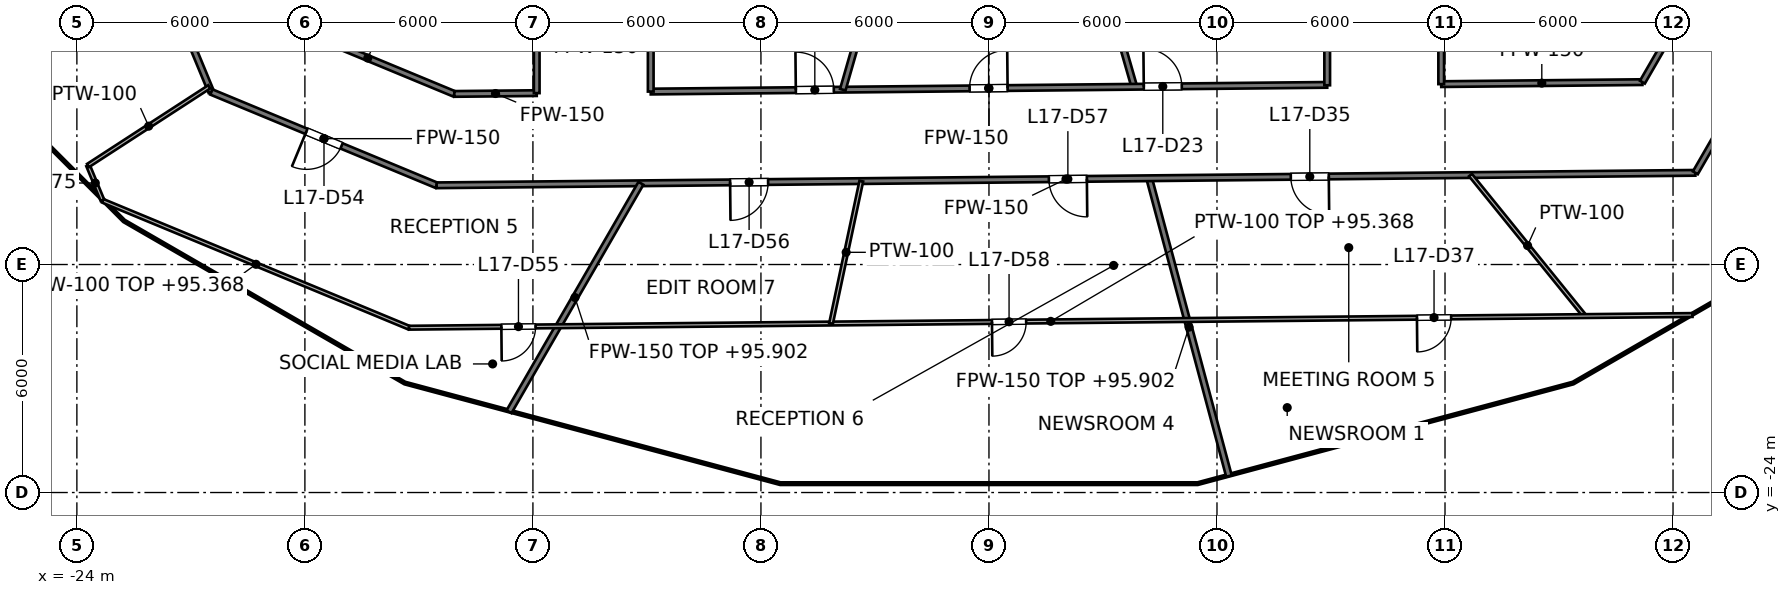
"""IFC4 building model, lengths in metres.
Left out: names, types, materials, properties, quantities, classifications, styles, units other than length and angle.
Written with IfcOpenShell. Run it as: python <this file> out.ifc"""

import sys

from ifc_helpers import new_model, si_unit, direction, frame, frame_2d, origin, place, context, subcontext, project, spatial, rectangle, extrude, element, fill, save


model = new_model("IFC4")
c1 = context("Model", 3, precision=1e-05, world=origin(), true_north=direction((0.0, 1.0)))
c2 = subcontext(c1, "Body", "Model", "MODEL_VIEW")
j1 = project(units=[si_unit("LENGTHUNIT", "METRE"), si_unit("PLANEANGLEUNIT", "RADIAN")], contexts=[c1])
p1 = place(None, origin())
s1 = spatial("IfcSite", under=j1, at=p1, CompositionType="ELEMENT")
p2 = place(p1, origin())
s2 = spatial("IfcBuilding", under=s1, at=p2, CompositionType="ELEMENT")
p3 = place(p2, frame((0.0, 0.0, 92.4)))
s3 = spatial("IfcBuildingStorey", under=s2, at=p3, CompositionType="ELEMENT", Elevation=92.4)
p4 = place(p3, frame((4.215, -15.73, 0.0), z_axis=(0.0, 0.0, 1.0), x_axis=(0.258844392232, -0.96591903419, 0.0)))
e1 = element("IfcWall", 1, at=p4, inside=s3, PredefinedType="PARTITIONING", context=c2, shape_type="SweptSolid", body=[
    extrude(rectangle(XDim=8.112, YDim=0.15, at=frame_2d((4.056, 0.0))), origin(), (0.0, 0.0, 1.0), 3.502),
])
p5 = place(p3, frame((2.296, -8.0, 0.0), z_axis=(0.0, 0.0, 1.0), x_axis=(0.275935525478, -0.961176147113, 0.0)))
e2 = element("IfcWall", 2, at=p5, inside=s3, PredefinedType="PARTITIONING", context=c2, shape_type="SweptSolid", body=[
    extrude(rectangle(XDim=5.548, YDim=0.15, at=frame_2d((2.774, 0.0))), origin(), (0.0, 0.0, 1.0), 3.9),
])
p6 = place(p3, frame((-22.9, -7.572, 0.0), z_axis=(0.0, 0.0, 1.0), x_axis=(0.382367581622, -0.924010298928, 0.0)))
e3 = element("IfcWall", 3, at=p6, inside=s3, PredefinedType="PARTITIONING", context=c2, shape_type="SweptSolid", body=[
    extrude(rectangle(XDim=6.374, YDim=0.15, at=frame_2d((3.187, 0.0))), origin(), (0.0, 0.0, 1.0), 2.977),
])
p7 = place(p6, frame((2.6, 0.0, 0.0)))
e4 = element("IfcOpeningElement", 4, at=p7, cuts=e3, PredefinedType="OPENING", context=c2, shape_type="SweptSolid", body=[
    extrude(rectangle(XDim=1.0, YDim=2.1, at=frame_2d((0.5, 1.05))), frame((0.0, 0.075, 0.0), z_axis=(0.0, -1.0, 0.0), x_axis=(1.0, 0.0, 0.0)), (0.0, 0.0, 1.0), 0.15),
])
p8 = place(p3, frame((-20.46, -13.46, 0.0), z_axis=(0.0, 0.0, 1.0), x_axis=(0.923801547606, -0.382871650349, 0.0)))
e5 = element("IfcWall", 5, at=p8, inside=s3, PredefinedType="PARTITIONING", context=c2, shape_type="SweptSolid", body=[
    extrude(rectangle(XDim=6.415, YDim=0.15, at=frame_2d((3.208, 0.0))), origin(), (0.0, 0.0, 1.0), 2.968),
])
p9 = place(p8, frame((2.707, 0.0, 0.0)))
e6 = element("IfcOpeningElement", 6, at=p9, cuts=e5, PredefinedType="OPENING", context=c2, shape_type="SweptSolid", body=[
    extrude(rectangle(XDim=1.0, YDim=2.1, at=frame_2d((0.5, 1.05))), frame((0.0, 0.075, 0.0), z_axis=(0.0, -1.0, 0.0), x_axis=(1.0, 0.0, 0.0)), (0.0, 0.0, 1.0), 0.15),
])
p10 = place(p3, frame((-18.623, -11.623, 0.0), z_axis=(0.0, 0.0, 1.0), x_axis=(0.923791670587, -0.38289548098, 0.0)))
e7 = element("IfcWall", 7, at=p10, inside=s3, PredefinedType="PARTITIONING", context=c2, shape_type="SweptSolid", body=[
    extrude(rectangle(XDim=4.931, YDim=0.15, at=frame_2d((2.465, 0.0))), origin(), (0.0, 0.0, 1.0), 2.968),
])
p11 = place(p3, frame((-14.534, -15.916, 0.0), z_axis=(0.0, 0.0, 1.0), x_axis=(0.999950930262, 0.009906415532, 0.0)))
e8 = element("IfcWall", 8, at=p11, inside=s3, PredefinedType="PARTITIONING", context=c2, shape_type="SweptSolid", body=[
    extrude(rectangle(XDim=33.123, YDim=0.15, at=frame_2d((16.561, 0.0))), origin(), (0.0, 0.0, 1.0), 2.968),
])
p12 = place(p11, frame((22.477, 0.0, 0.0)))
e9 = element("IfcOpeningElement", 9, at=p12, cuts=e8, PredefinedType="OPENING", context=c2, shape_type="SweptSolid", body=[
    extrude(rectangle(XDim=1.0, YDim=2.1, at=frame_2d((0.5, 1.05))), frame((0.0, 0.075, 0.0), z_axis=(0.0, -1.0, 0.0), x_axis=(1.0, 0.0, 0.0)), (0.0, 0.0, 1.0), 0.15),
])
p13 = place(p11, frame((7.723, 0.0, 0.0)))
e10 = element("IfcOpeningElement", 10, at=p13, cuts=e8, PredefinedType="OPENING", context=c2, shape_type="SweptSolid", body=[
    extrude(rectangle(XDim=1.0, YDim=2.1, at=frame_2d((0.5, 1.05))), frame((0.0, 0.075, 0.0), z_axis=(0.0, -1.0, 0.0), x_axis=(1.0, 0.0, 0.0)), (0.0, 0.0, 1.0), 0.15),
])
p14 = place(p11, frame((16.111, 0.0, 0.0)))
e11 = element("IfcOpeningElement", 11, at=p14, cuts=e8, PredefinedType="OPENING", context=c2, shape_type="SweptSolid", body=[
    extrude(rectangle(XDim=1.0, YDim=2.1, at=frame_2d((0.5, 1.05))), frame((0.0, 0.075, 0.0), z_axis=(0.0, -1.0, 0.0), x_axis=(1.0, 0.0, 0.0)), (0.0, 0.0, 1.0), 0.15),
])
p15 = place(p3, frame((-14.068, -13.511, 0.0), z_axis=(0.0, 0.0, 1.0), x_axis=(0.999950911515, 0.009908307647, 0.0)))
e12 = element("IfcWall", 12, at=p15, inside=s3, PredefinedType="PARTITIONING", context=c2, shape_type="SweptSolid", body=[
    extrude(rectangle(XDim=2.168, YDim=0.15, at=frame_2d((1.084, 0.0))), origin(), (0.0, 0.0, 1.0), 2.968),
])
p16 = place(p3, frame((-8.9, -13.449, 0.0), z_axis=(0.0, 0.0, 1.0), x_axis=(0.999950834077, 0.009916119672, 0.0)))
e13 = element("IfcWall", 13, at=p16, inside=s3, PredefinedType="PARTITIONING", context=c2, shape_type="SweptSolid", body=[
    extrude(rectangle(XDim=17.801, YDim=0.15, at=frame_2d((8.9, 0.0))), origin(), (0.0, 0.0, 1.0), 2.968),
])
p17 = place(p16, frame((3.818, 0.0, 0.0)))
e14 = element("IfcOpeningElement", 14, at=p17, cuts=e13, PredefinedType="OPENING", context=c2, shape_type="SweptSolid", body=[
    extrude(rectangle(XDim=1.0, YDim=2.1, at=frame_2d((0.5, 1.05))), frame((0.0, 0.075, 0.0), z_axis=(0.0, -1.0, 0.0), x_axis=(1.0, 0.0, 0.0)), (0.0, 0.0, 1.0), 0.15),
])
p18 = place(p16, frame((8.391, 0.0, 0.0)))
e15 = element("IfcOpeningElement", 15, at=p18, cuts=e13, PredefinedType="OPENING", context=c2, shape_type="SweptSolid", body=[
    extrude(rectangle(XDim=1.0, YDim=2.1, at=frame_2d((0.5, 1.05))), frame((0.0, 0.075, 0.0), z_axis=(0.0, -1.0, 0.0), x_axis=(1.0, 0.0, 0.0)), (0.0, 0.0, 1.0), 0.15),
])
p19 = place(p16, frame((12.975, 0.0, 0.0)))
e16 = element("IfcOpeningElement", 16, at=p19, cuts=e13, PredefinedType="OPENING", context=c2, shape_type="SweptSolid", body=[
    extrude(rectangle(XDim=1.0, YDim=2.1, at=frame_2d((0.5, 1.05))), frame((0.0, 0.075, 0.0), z_axis=(0.0, -1.0, 0.0), x_axis=(1.0, 0.0, 0.0)), (0.0, 0.0, 1.0), 0.15),
])
p20 = place(p3, frame((11.9, -13.253, 0.0), z_axis=(0.0, 0.0, 1.0), x_axis=(0.999950853109, 0.009914200296, 0.0)))
e17 = element("IfcWall", 17, at=p20, inside=s3, PredefinedType="PARTITIONING", context=c2, shape_type="SweptSolid", body=[
    extrude(rectangle(XDim=5.294, YDim=0.15, at=frame_2d((2.647, 0.0))), origin(), (0.0, 0.0, 1.0), 2.968),
])
p21 = place(p3, frame((18.587, -15.587, 0.0), z_axis=(0.0, 0.0, 1.0), x_axis=(0.500026433136, 0.866010142069, 0.0)))
e18 = element("IfcWall", 18, at=p21, inside=s3, PredefinedType="PARTITIONING", context=c2, shape_type="SweptSolid", body=[
    extrude(rectangle(XDim=8.713, YDim=0.15, at=frame_2d((4.357, 0.0))), origin(), (0.0, 0.0, 1.0), 2.968),
])
p22 = place(p21, frame((3.807, 0.0, 0.0)))
e19 = element("IfcOpeningElement", 19, at=p22, cuts=e18, PredefinedType="OPENING", context=c2, shape_type="SweptSolid", body=[
    extrude(rectangle(XDim=1.0, YDim=2.1, at=frame_2d((0.5, 1.05))), frame((0.0, 0.075, 0.0), z_axis=(0.0, -1.0, 0.0), x_axis=(1.0, 0.0, 0.0)), (0.0, 0.0, 1.0), 0.15),
])
p23 = place(p3, frame((17.194, -13.201, 0.0), z_axis=(0.0, 0.0, 1.0), x_axis=(0.50001062018, 0.866019272134, 0.0)))
e20 = element("IfcWall", 20, at=p23, inside=s3, PredefinedType="PARTITIONING", context=c2, shape_type="SweptSolid", body=[
    extrude(rectangle(XDim=6.674, YDim=0.15, at=frame_2d((3.337, 0.0))), origin(), (0.0, 0.0, 1.0), 2.968),
])
p24 = place(p23, frame((2.833, 0.0, 0.0)))
e21 = element("IfcOpeningElement", 21, at=p24, cuts=e20, PredefinedType="OPENING", context=c2, shape_type="SweptSolid", body=[
    extrude(rectangle(XDim=1.0, YDim=2.1, at=frame_2d((0.5, 1.05))), frame((0.0, 0.075, 0.0), z_axis=(0.0, -1.0, 0.0), x_axis=(1.0, 0.0, 0.0)), (0.0, 0.0, 1.0), 0.15),
])
p25 = place(p3, frame((-12.629, -21.874, 0.0), z_axis=(0.0, 0.0, 1.0), x_axis=(0.499986326517, 0.86603329803, 0.0)))
e22 = element("IfcWall", 22, at=p25, inside=s3, PredefinedType="PARTITIONING", context=c2, shape_type="SweptSolid", body=[
    extrude(rectangle(XDim=6.941, YDim=0.15, at=frame_2d((3.471, 0.0))), origin(), (0.0, 0.0, 1.0), 3.502),
])
p26 = place(p3, frame((-3.846, -13.399, 0.0), z_axis=(0.0, 0.0, 1.0), x_axis=(0.275914969745, 0.961182048038, 0.0)))
e23 = element("IfcWall", 23, at=p26, inside=s3, PredefinedType="PARTITIONING", context=c2, shape_type="SweptSolid", body=[
    extrude(rectangle(XDim=5.617, YDim=0.15, at=frame_2d((2.809, 0.0))), origin(), (0.0, 0.0, 1.0), 3.9),
])
p27 = place(p3, frame((11.9, -13.253, 0.0), z_axis=(0.0, 0.0, 1.0), x_axis=(0.0, 1.0, 0.0)))
e24 = element("IfcWall", 24, at=p27, inside=s3, PredefinedType="PARTITIONING", context=c2, shape_type="SweptSolid", body=[
    extrude(rectangle(XDim=5.253, YDim=0.15, at=frame_2d((2.626, 0.0))), origin(), (0.0, 0.0, 1.0), 2.968),
])
p28 = place(p3, frame((8.9, -13.283, 0.0), z_axis=(0.0, 0.0, 1.0), x_axis=(0.0, 1.0, 0.0)))
e25 = element("IfcWall", 25, at=p28, inside=s3, PredefinedType="PARTITIONING", context=c2, shape_type="SweptSolid", body=[
    extrude(rectangle(XDim=5.283, YDim=0.15, at=frame_2d((2.642, 0.0))), origin(), (0.0, 0.0, 1.0), 2.968),
])
p29 = place(p3, frame((-8.9, -13.449, 0.0), z_axis=(0.0, 0.0, 1.0), x_axis=(0.0, 1.0, 0.0)))
e26 = element("IfcWall", 26, at=p29, inside=s3, PredefinedType="PARTITIONING", context=c2, shape_type="SweptSolid", body=[
    extrude(rectangle(XDim=5.449, YDim=0.15, at=frame_2d((2.725, 0.0))), origin(), (0.0, 0.0, 1.0), 2.968),
])
p30 = place(p3, frame((-11.9, -13.49, 0.0), z_axis=(0.0, 0.0, 1.0), x_axis=(0.0, 1.0, 0.0)))
e27 = element("IfcWall", 27, at=p30, inside=s3, PredefinedType="PARTITIONING", context=c2, shape_type="SweptSolid", body=[
    extrude(rectangle(XDim=5.49, YDim=0.15, at=frame_2d((2.745, 0.0))), origin(), (0.0, 0.0, 1.0), 2.968),
])
p31 = place(p30, frame((2.245, 0.0, 0.0)))
e28 = element("IfcOpeningElement", 28, at=p31, cuts=e27, PredefinedType="OPENING", context=c2, shape_type="SweptSolid", body=[
    extrude(rectangle(XDim=1.0, YDim=2.1, at=frame_2d((0.5, 1.05))), frame((0.0, 0.075, 0.0), z_axis=(0.0, -1.0, 0.0), x_axis=(1.0, 0.0, 0.0)), (0.0, 0.0, 1.0), 0.15),
])
p32 = place(p3, frame((-23.706, -15.395, 0.0), z_axis=(0.0, 0.0, 1.0), x_axis=(0.382734348683, -0.923858440638, 0.0)))
e29 = element("IfcWall", 29, at=p32, inside=s3, PredefinedType="PARTITIONING", context=c2, shape_type="SweptSolid", body=[
    extrude(rectangle(XDim=0.996, YDim=0.1, at=frame_2d((0.498, 0.0))), origin(), (0.0, 0.0, 1.0), 3.675),
])
p33 = place(p3, frame((12.67, -15.646, 0.0), z_axis=(0.0, 0.0, 1.0), x_axis=(0.629429152062, -0.777057875923, 0.0)))
e30 = element("IfcWall", 30, at=p33, inside=s3, PredefinedType="PARTITIONING", context=c2, shape_type="SweptSolid", body=[
    extrude(rectangle(XDim=4.774, YDim=0.1, at=frame_2d((2.387, 0.0))), origin(), (0.0, 0.0, 1.0), 3.9),
])
p34 = place(p3, frame((-23.315, -16.325, 0.0), z_axis=(0.0, 0.0, 1.0), x_axis=(0.923811686722, -0.382847185541, 0.0)))
e31 = element("IfcWall", 31, at=p34, inside=s3, PredefinedType="PARTITIONING", context=c2, shape_type="SweptSolid", body=[
    extrude(rectangle(XDim=8.719, YDim=0.1, at=frame_2d((4.36, 0.0))), origin(), (0.0, 0.0, 1.0), 2.968),
])
p35 = place(p3, frame((-15.26, -19.663, 0.0), z_axis=(0.0, 0.0, 1.0), x_axis=(0.999951032014, 0.009896139397, 0.0)))
e32 = element("IfcWall", 32, at=p35, inside=s3, PredefinedType="PARTITIONING", context=c2, shape_type="SweptSolid", body=[
    extrude(rectangle(XDim=33.774, YDim=0.1, at=frame_2d((16.887, 0.0))), origin(), (0.0, 0.0, 1.0), 2.968),
])
p36 = place(p35, frame((26.523, 0.0, 0.0)))
e33 = element("IfcOpeningElement", 33, at=p36, cuts=e32, PredefinedType="OPENING", context=c2, shape_type="SweptSolid", body=[
    extrude(rectangle(XDim=0.9, YDim=2.1, at=frame_2d((0.45, 1.05))), frame((0.0, 0.05, 0.0), z_axis=(0.0, -1.0, 0.0), x_axis=(1.0, 0.0, 0.0)), (0.0, 0.0, 1.0), 0.1),
])
p37 = place(p35, frame((2.43, 0.0, 0.0)))
e34 = element("IfcOpeningElement", 34, at=p37, cuts=e32, PredefinedType="OPENING", context=c2, shape_type="SweptSolid", body=[
    extrude(rectangle(XDim=0.9, YDim=2.1, at=frame_2d((0.45, 1.05))), frame((0.0, 0.05, 0.0), z_axis=(0.0, -1.0, 0.0), x_axis=(1.0, 0.0, 0.0)), (0.0, 0.0, 1.0), 0.1),
])
p38 = place(p35, frame((15.34, 0.0, 0.0)))
e35 = element("IfcOpeningElement", 35, at=p38, cuts=e32, PredefinedType="OPENING", context=c2, shape_type="SweptSolid", body=[
    extrude(rectangle(XDim=0.9, YDim=2.1, at=frame_2d((0.45, 1.05))), frame((0.0, 0.05, 0.0), z_axis=(0.0, -1.0, 0.0), x_axis=(1.0, 0.0, 0.0)), (0.0, 0.0, 1.0), 0.1),
])
p39 = place(p3, frame((-23.706, -15.395, 0.0), z_axis=(0.0, 0.0, 1.0), x_axis=(0.838733884708, 0.544541523341, 0.0)))
e36 = element("IfcWall", 36, at=p39, inside=s3, PredefinedType="PARTITIONING", context=c2, shape_type="SweptSolid", body=[
    extrude(rectangle(XDim=3.803, YDim=0.1, at=frame_2d((1.902, 0.0))), origin(), (0.0, 0.0, 1.0), 3.9),
])
p40 = place(p3, frame((-4.156, -19.553, 0.0), z_axis=(0.0, 0.0, 1.0), x_axis=(0.208023345905, 0.978123861052, 0.0)))
e37 = element("IfcWall", 37, at=p40, inside=s3, PredefinedType="PARTITIONING", context=c2, shape_type="SweptSolid", body=[
    extrude(rectangle(XDim=3.832, YDim=0.1, at=frame_2d((1.916, 0.0))), origin(), (0.0, 0.0, 1.0), 3.9),
])
p41 = place(p17, origin())
e38 = element("IfcDoor", 38, at=p41, inside=s3, OperationType="SINGLE_SWING_LEFT", PredefinedType="DOOR", context=c2, shape_type="SweptSolid", body=[
    extrude(rectangle(XDim=1.0, YDim=2.1, at=frame_2d((0.5, 1.05))), frame((0.0, 0.025, 0.0), z_axis=(0.0, -1.0, 0.0), x_axis=(1.0, 0.0, 0.0)), (0.0, 0.0, 1.0), 0.05),
])
fill(e14, e38)
p42 = place(p18, origin())
e39 = element("IfcDoor", 39, at=p42, inside=s3, OperationType="SINGLE_SWING_RIGHT", PredefinedType="DOOR", context=c2, shape_type="SweptSolid", body=[
    extrude(rectangle(XDim=1.0, YDim=2.1, at=frame_2d((0.5, 1.05))), frame((0.0, 0.025, 0.0), z_axis=(0.0, -1.0, 0.0), x_axis=(1.0, 0.0, 0.0)), (0.0, 0.0, 1.0), 0.05),
])
fill(e15, e39)
p43 = place(p19, origin())
e40 = element("IfcDoor", 40, at=p43, inside=s3, OperationType="SINGLE_SWING_LEFT", PredefinedType="DOOR", context=c2, shape_type="SweptSolid", body=[
    extrude(rectangle(XDim=1.0, YDim=2.1, at=frame_2d((0.5, 1.05))), frame((0.0, 0.025, 0.0), z_axis=(0.0, -1.0, 0.0), x_axis=(1.0, 0.0, 0.0)), (0.0, 0.0, 1.0), 0.05),
])
fill(e16, e40)
p44 = place(p12, origin())
e41 = element("IfcDoor", 41, at=p44, inside=s3, OperationType="SINGLE_SWING_RIGHT", PredefinedType="DOOR", context=c2, shape_type="SweptSolid", body=[
    extrude(rectangle(XDim=1.0, YDim=2.1, at=frame_2d((0.5, 1.05))), frame((0.0, 0.025, 0.0), z_axis=(0.0, -1.0, 0.0), x_axis=(1.0, 0.0, 0.0)), (0.0, 0.0, 1.0), 0.05),
])
fill(e9, e41)
p45 = place(p36, origin())
e42 = element("IfcDoor", 42, at=p45, inside=s3, OperationType="SINGLE_SWING_LEFT", PredefinedType="DOOR", context=c2, shape_type="SweptSolid", body=[
    extrude(rectangle(XDim=0.9, YDim=2.1, at=frame_2d((0.45, 1.05))), frame((0.0, 0.025, 0.0), z_axis=(0.0, -1.0, 0.0), x_axis=(1.0, 0.0, 0.0)), (0.0, 0.0, 1.0), 0.05),
])
fill(e33, e42)
p46 = place(p9, origin())
e43 = element("IfcDoor", 43, at=p46, inside=s3, OperationType="SINGLE_SWING_LEFT", PredefinedType="DOOR", context=c2, shape_type="SweptSolid", body=[
    extrude(rectangle(XDim=1.0, YDim=2.1, at=frame_2d((0.5, 1.05))), frame((0.0, 0.025, 0.0), z_axis=(0.0, -1.0, 0.0), x_axis=(1.0, 0.0, 0.0)), (0.0, 0.0, 1.0), 0.05),
])
fill(e6, e43)
p47 = place(p37, origin())
e44 = element("IfcDoor", 44, at=p47, inside=s3, OperationType="SINGLE_SWING_LEFT", PredefinedType="DOOR", context=c2, shape_type="SweptSolid", body=[
    extrude(rectangle(XDim=0.9, YDim=2.1, at=frame_2d((0.45, 1.05))), frame((0.0, 0.025, 0.0), z_axis=(0.0, -1.0, 0.0), x_axis=(1.0, 0.0, 0.0)), (0.0, 0.0, 1.0), 0.05),
])
fill(e34, e44)
p48 = place(p13, origin())
e45 = element("IfcDoor", 45, at=p48, inside=s3, OperationType="SINGLE_SWING_LEFT", PredefinedType="DOOR", context=c2, shape_type="SweptSolid", body=[
    extrude(rectangle(XDim=1.0, YDim=2.1, at=frame_2d((0.5, 1.05))), frame((0.0, 0.025, 0.0), z_axis=(0.0, -1.0, 0.0), x_axis=(1.0, 0.0, 0.0)), (0.0, 0.0, 1.0), 0.05),
])
fill(e10, e45)
p49 = place(p14, origin())
e46 = element("IfcDoor", 46, at=p49, inside=s3, OperationType="SINGLE_SWING_RIGHT", PredefinedType="DOOR", context=c2, shape_type="SweptSolid", body=[
    extrude(rectangle(XDim=1.0, YDim=2.1, at=frame_2d((0.5, 1.05))), frame((0.0, 0.025, 0.0), z_axis=(0.0, -1.0, 0.0), x_axis=(1.0, 0.0, 0.0)), (0.0, 0.0, 1.0), 0.05),
])
fill(e11, e46)
p50 = place(p38, origin())
e47 = element("IfcDoor", 47, at=p50, inside=s3, OperationType="SINGLE_SWING_LEFT", PredefinedType="DOOR", context=c2, shape_type="SweptSolid", body=[
    extrude(rectangle(XDim=0.9, YDim=2.1, at=frame_2d((0.45, 1.05))), frame((0.0, 0.025, 0.0), z_axis=(0.0, -1.0, 0.0), x_axis=(1.0, 0.0, 0.0)), (0.0, 0.0, 1.0), 0.05),
])
fill(e35, e47)
save(model, sys.argv[1])
